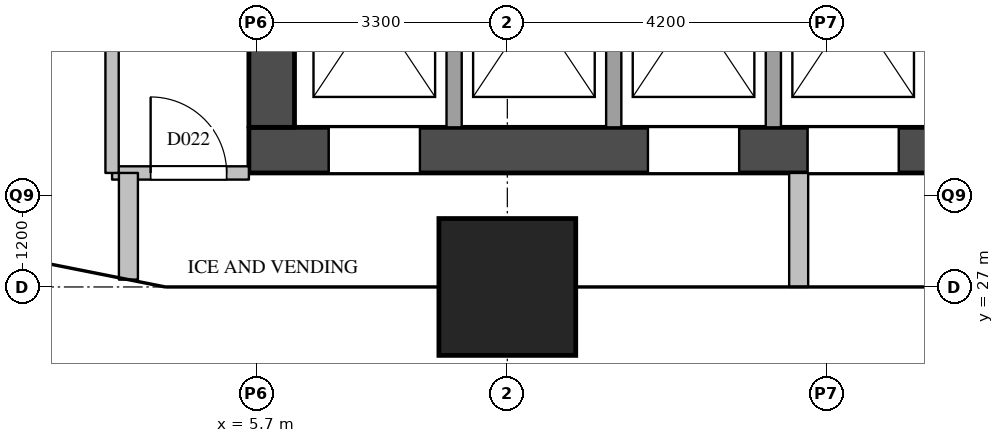
"""IFC4 building model, lengths in metres.
Left out: names, types, materials, properties, quantities, classifications, styles, units other than length and angle.
Written with IfcOpenShell. Run it as: python <this file> out.ifc"""

import sys

from ifc_helpers import new_model, si_unit, direction, frame, frame_2d, origin, origin_2d, place, context, subcontext, project, spatial, rectangle, extrude, element, fill, save


model = new_model("IFC4")
c1 = context("Model", 3, precision=1e-05, world=origin(), true_north=direction((0.0, 1.0)))
c2 = subcontext(c1, "Body", "Model", "MODEL_VIEW")
j1 = project(units=[si_unit("LENGTHUNIT", "METRE"), si_unit("PLANEANGLEUNIT", "RADIAN")], contexts=[c1])
p1 = place(None, origin())
s1 = spatial("IfcSite", under=j1, at=p1, CompositionType="ELEMENT")
p2 = place(p1, origin())
s2 = spatial("IfcBuilding", under=s1, at=p2, CompositionType="ELEMENT")
p3 = place(p2, frame((0.0, 0.0, 108.2)))
s3 = spatial("IfcBuildingStorey", under=s2, at=p3, CompositionType="ELEMENT", Elevation=108.2)
p4 = place(p3, frame((9.0, 27.0, 0.0), z_axis=(0.0, 0.0, 1.0), x_axis=(1.0, 0.0, 0.0)))
e1 = element("IfcColumn", 1, at=p4, inside=s3, PredefinedType="COLUMN", context=c2, shape_type="SweptSolid", body=[
    extrude(rectangle(XDim=1.8, YDim=1.8, at=origin_2d()), origin(), (0.0, 0.0, 1.0), 3.8),
])
p5 = place(p3, frame((5.6, 28.8, 0.0), z_axis=(0.0, 0.0, 1.0), x_axis=(1.0, 0.0, 0.0)))
e2 = element("IfcWall", 2, at=p5, inside=s3, PredefinedType="SHEAR", context=c2, shape_type="SweptSolid", body=[
    extrude(rectangle(XDim=12.4, YDim=0.6, at=frame_2d((6.2, 0.0))), origin(), (0.0, 0.0, 1.0), 3.5),
])
p6 = place(p5, frame((1.05, 0.0, 0.0)))
e3 = element("IfcOpeningElement", 3, at=p6, cuts=e2, PredefinedType="OPENING", context=c2, shape_type="SweptSolid", body=[
    extrude(rectangle(XDim=1.2, YDim=2.1, at=frame_2d((0.6, 1.05))), frame((0.0, 0.31, 0.0), z_axis=(0.0, -1.0, 0.0), x_axis=(1.0, 0.0, 0.0)), (0.0, 0.0, 1.0), 0.62),
])
p7 = place(p5, frame((5.25, 0.0, 0.0)))
e4 = element("IfcOpeningElement", 4, at=p7, cuts=e2, PredefinedType="OPENING", context=c2, shape_type="SweptSolid", body=[
    extrude(rectangle(XDim=1.2, YDim=2.1, at=frame_2d((0.6, 1.05))), frame((0.0, 0.31, 0.0), z_axis=(0.0, -1.0, 0.0), x_axis=(1.0, 0.0, 0.0)), (0.0, 0.0, 1.0), 0.62),
])
p8 = place(p5, frame((7.35, 0.0, 0.0)))
e5 = element("IfcOpeningElement", 5, at=p8, cuts=e2, PredefinedType="OPENING", context=c2, shape_type="SweptSolid", body=[
    extrude(rectangle(XDim=1.2, YDim=2.1, at=frame_2d((0.6, 1.05))), frame((0.0, 0.31, 0.0), z_axis=(0.0, -1.0, 0.0), x_axis=(1.0, 0.0, 0.0)), (0.0, 0.0, 1.0), 0.62),
])
p9 = place(p3, frame((5.9, 29.1, 0.0), z_axis=(0.0, 0.0, 1.0), x_axis=(0.0, 1.0, 0.0)))
e6 = element("IfcWall", 6, at=p9, inside=s3, PredefinedType="SHEAR", context=c2, shape_type="SweptSolid", body=[
    extrude(rectangle(XDim=20.3, YDim=0.6, at=frame_2d((10.15, 0.0))), origin(), (0.0, 0.0, 1.0), 3.5),
])
p10 = place(p9, frame((3.6, 0.0, 0.0)))
e7 = element("IfcOpeningElement", 7, at=p10, cuts=e6, PredefinedType="OPENING", context=c2, shape_type="SweptSolid", body=[
    extrude(rectangle(XDim=1.8, YDim=2.1, at=frame_2d((0.9, 1.05))), frame((0.0, 0.31, 0.0), z_axis=(0.0, -1.0, 0.0), x_axis=(1.0, 0.0, 0.0)), (0.0, 0.0, 1.0), 0.62),
])
p11 = place(p9, frame((16.4, 0.0, 0.0)))
e8 = element("IfcOpeningElement", 8, at=p11, cuts=e6, PredefinedType="OPENING", context=c2, shape_type="SweptSolid", body=[
    extrude(rectangle(XDim=1.0, YDim=2.1, at=frame_2d((0.5, 1.05))), frame((0.0, 0.31, 0.0), z_axis=(0.0, -1.0, 0.0), x_axis=(1.0, 0.0, 0.0)), (0.0, 0.0, 1.0), 0.62),
])
for number, where, z_axis, x_axis in (
    (9, (8.3, 29.1, 0.0), (0.0, 0.0, 1.0), (0.0, 1.0, 0.0)),
    (10, (10.4, 29.1, 0.0), (0.0, 0.0, 1.0), (0.0, 1.0, 0.0)),
    (11, (12.5, 29.1, 0.0), (0.0, 0.0, 1.0), (0.0, 1.0, 0.0)),
):
    element("IfcWall", number, at=place(p3, frame(where, z_axis=z_axis, x_axis=x_axis)), inside=s3, PredefinedType="SOLIDWALL", context=c2, shape_type="SweptSolid", body=[
        extrude(rectangle(XDim=3.2, YDim=0.2, at=frame_2d((1.6, 0.0))), origin(), (0.0, 0.0, 1.0), 3.5),
    ])
p12 = place(p3, frame((3.8, 28.5, 0.0), z_axis=(0.0, 0.0, 1.0), x_axis=(1.0, 0.0, 0.0)))
e12 = element("IfcWall", 12, at=p12, inside=s3, PredefinedType="PARTITIONING", context=c2, shape_type="SweptSolid", body=[
    extrude(rectangle(XDim=1.8, YDim=0.175, at=frame_2d((0.9, 0.0))), origin(), (0.0, 0.0, 1.0), 3.5),
])
p13 = place(p12, frame((0.507, 0.0, 0.0)))
e13 = element("IfcOpeningElement", 13, at=p13, cuts=e12, PredefinedType="OPENING", context=c2, shape_type="SweptSolid", body=[
    extrude(rectangle(XDim=1.0, YDim=2.1, at=frame_2d((0.5, 1.05))), frame((0.0, 0.097, 0.0), z_axis=(0.0, -1.0, 0.0), x_axis=(1.0, 0.0, 0.0)), (0.0, 0.0, 1.0), 0.195),
])
p14 = place(p3, frame((3.8, 28.5, 0.0), z_axis=(0.0, 0.0, 1.0), x_axis=(0.0, 1.0, 0.0)))
e14 = element("IfcWall", 14, at=p14, inside=s3, PredefinedType="PARTITIONING", context=c2, shape_type="SweptSolid", body=[
    extrude(rectangle(XDim=23.3, YDim=0.175, at=frame_2d((11.65, 0.0))), origin(), (0.0, 0.0, 1.0), 3.5),
])
p15 = place(p14, frame((3.3, 0.0, 0.0)))
e15 = element("IfcOpeningElement", 15, at=p15, cuts=e14, PredefinedType="OPENING", context=c2, shape_type="SweptSolid", body=[
    extrude(rectangle(XDim=0.9, YDim=2.1, at=frame_2d((0.45, 1.05))), frame((0.0, 0.097, 0.0), z_axis=(0.0, -1.0, 0.0), x_axis=(1.0, 0.0, 0.0)), (0.0, 0.0, 1.0), 0.195),
])
p16 = place(p14, frame((13.05, 0.0, 0.0)))
e16 = element("IfcOpeningElement", 16, at=p16, cuts=e14, PredefinedType="OPENING", context=c2, shape_type="SweptSolid", body=[
    extrude(rectangle(XDim=0.9, YDim=2.1, at=frame_2d((0.45, 1.05))), frame((0.0, 0.097, 0.0), z_axis=(0.0, -1.0, 0.0), x_axis=(1.0, 0.0, 0.0)), (0.0, 0.0, 1.0), 0.195),
])
p17 = place(p14, frame((20.95, 0.0, 0.0)))
e17 = element("IfcOpeningElement", 17, at=p17, cuts=e14, PredefinedType="OPENING", context=c2, shape_type="SweptSolid", body=[
    extrude(rectangle(XDim=0.9, YDim=2.1, at=frame_2d((0.45, 1.05))), frame((0.0, 0.097, 0.0), z_axis=(0.0, -1.0, 0.0), x_axis=(1.0, 0.0, 0.0)), (0.0, 0.0, 1.0), 0.195),
])
p18 = place(p3, frame((4.015, 27.096, 0.0), z_axis=(0.0, 0.0, 1.0), x_axis=(0.0, 1.0, 0.0)))
e18 = element("IfcWall", 18, at=p18, inside=s3, PredefinedType="PARTITIONING", context=c2, shape_type="SweptSolid", body=[
    extrude(rectangle(XDim=1.404, YDim=0.25, at=frame_2d((0.702, 0.0))), origin(), (0.0, 0.0, 1.0), 2.5),
])
p19 = place(p3, frame((12.833, 27.0, 0.0), z_axis=(0.0, 0.0, 1.0), x_axis=(0.0, 1.0, 0.0)))
e19 = element("IfcWall", 19, at=p19, inside=s3, PredefinedType="PARTITIONING", context=c2, shape_type="SweptSolid", body=[
    extrude(rectangle(XDim=1.5, YDim=0.25, at=frame_2d((0.75, 0.0))), origin(), (0.0, 0.0, 1.0), 2.5),
])
p20 = place(p6, origin())
e20 = element("IfcDoor", 20, at=p20, inside=s3, OperationType="SLIDING_TO_LEFT", PredefinedType="DOOR", context=c2, shape_type="SweptSolid", body=[
    extrude(rectangle(XDim=1.2, YDim=2.1, at=frame_2d((0.6, 1.05))), frame((0.0, 0.025, 0.0), z_axis=(0.0, -1.0, 0.0), x_axis=(1.0, 0.0, 0.0)), (0.0, 0.0, 1.0), 0.05),
])
fill(e3, e20)
p21 = place(p7, origin())
e21 = element("IfcDoor", 21, at=p21, inside=s3, OperationType="SLIDING_TO_LEFT", PredefinedType="DOOR", context=c2, shape_type="SweptSolid", body=[
    extrude(rectangle(XDim=1.2, YDim=2.1, at=frame_2d((0.6, 1.05))), frame((0.0, 0.025, 0.0), z_axis=(0.0, -1.0, 0.0), x_axis=(1.0, 0.0, 0.0)), (0.0, 0.0, 1.0), 0.05),
])
fill(e4, e21)
p22 = place(p8, origin())
e22 = element("IfcDoor", 22, at=p22, inside=s3, OperationType="SLIDING_TO_LEFT", PredefinedType="DOOR", context=c2, shape_type="SweptSolid", body=[
    extrude(rectangle(XDim=1.2, YDim=2.1, at=frame_2d((0.6, 1.05))), frame((0.0, 0.025, 0.0), z_axis=(0.0, -1.0, 0.0), x_axis=(1.0, 0.0, 0.0)), (0.0, 0.0, 1.0), 0.05),
])
fill(e5, e22)
p23 = place(p13, origin())
e23 = element("IfcDoor", 23, at=p23, inside=s3, OperationType="SINGLE_SWING_LEFT", PredefinedType="DOOR", context=c2, shape_type="SweptSolid", body=[
    extrude(rectangle(XDim=1.0, YDim=2.1, at=frame_2d((0.5, 1.05))), frame((0.0, 0.025, 0.0), z_axis=(0.0, -1.0, 0.0), x_axis=(1.0, 0.0, 0.0)), (0.0, 0.0, 1.0), 0.05),
])
fill(e13, e23)
save(model, sys.argv[1])
